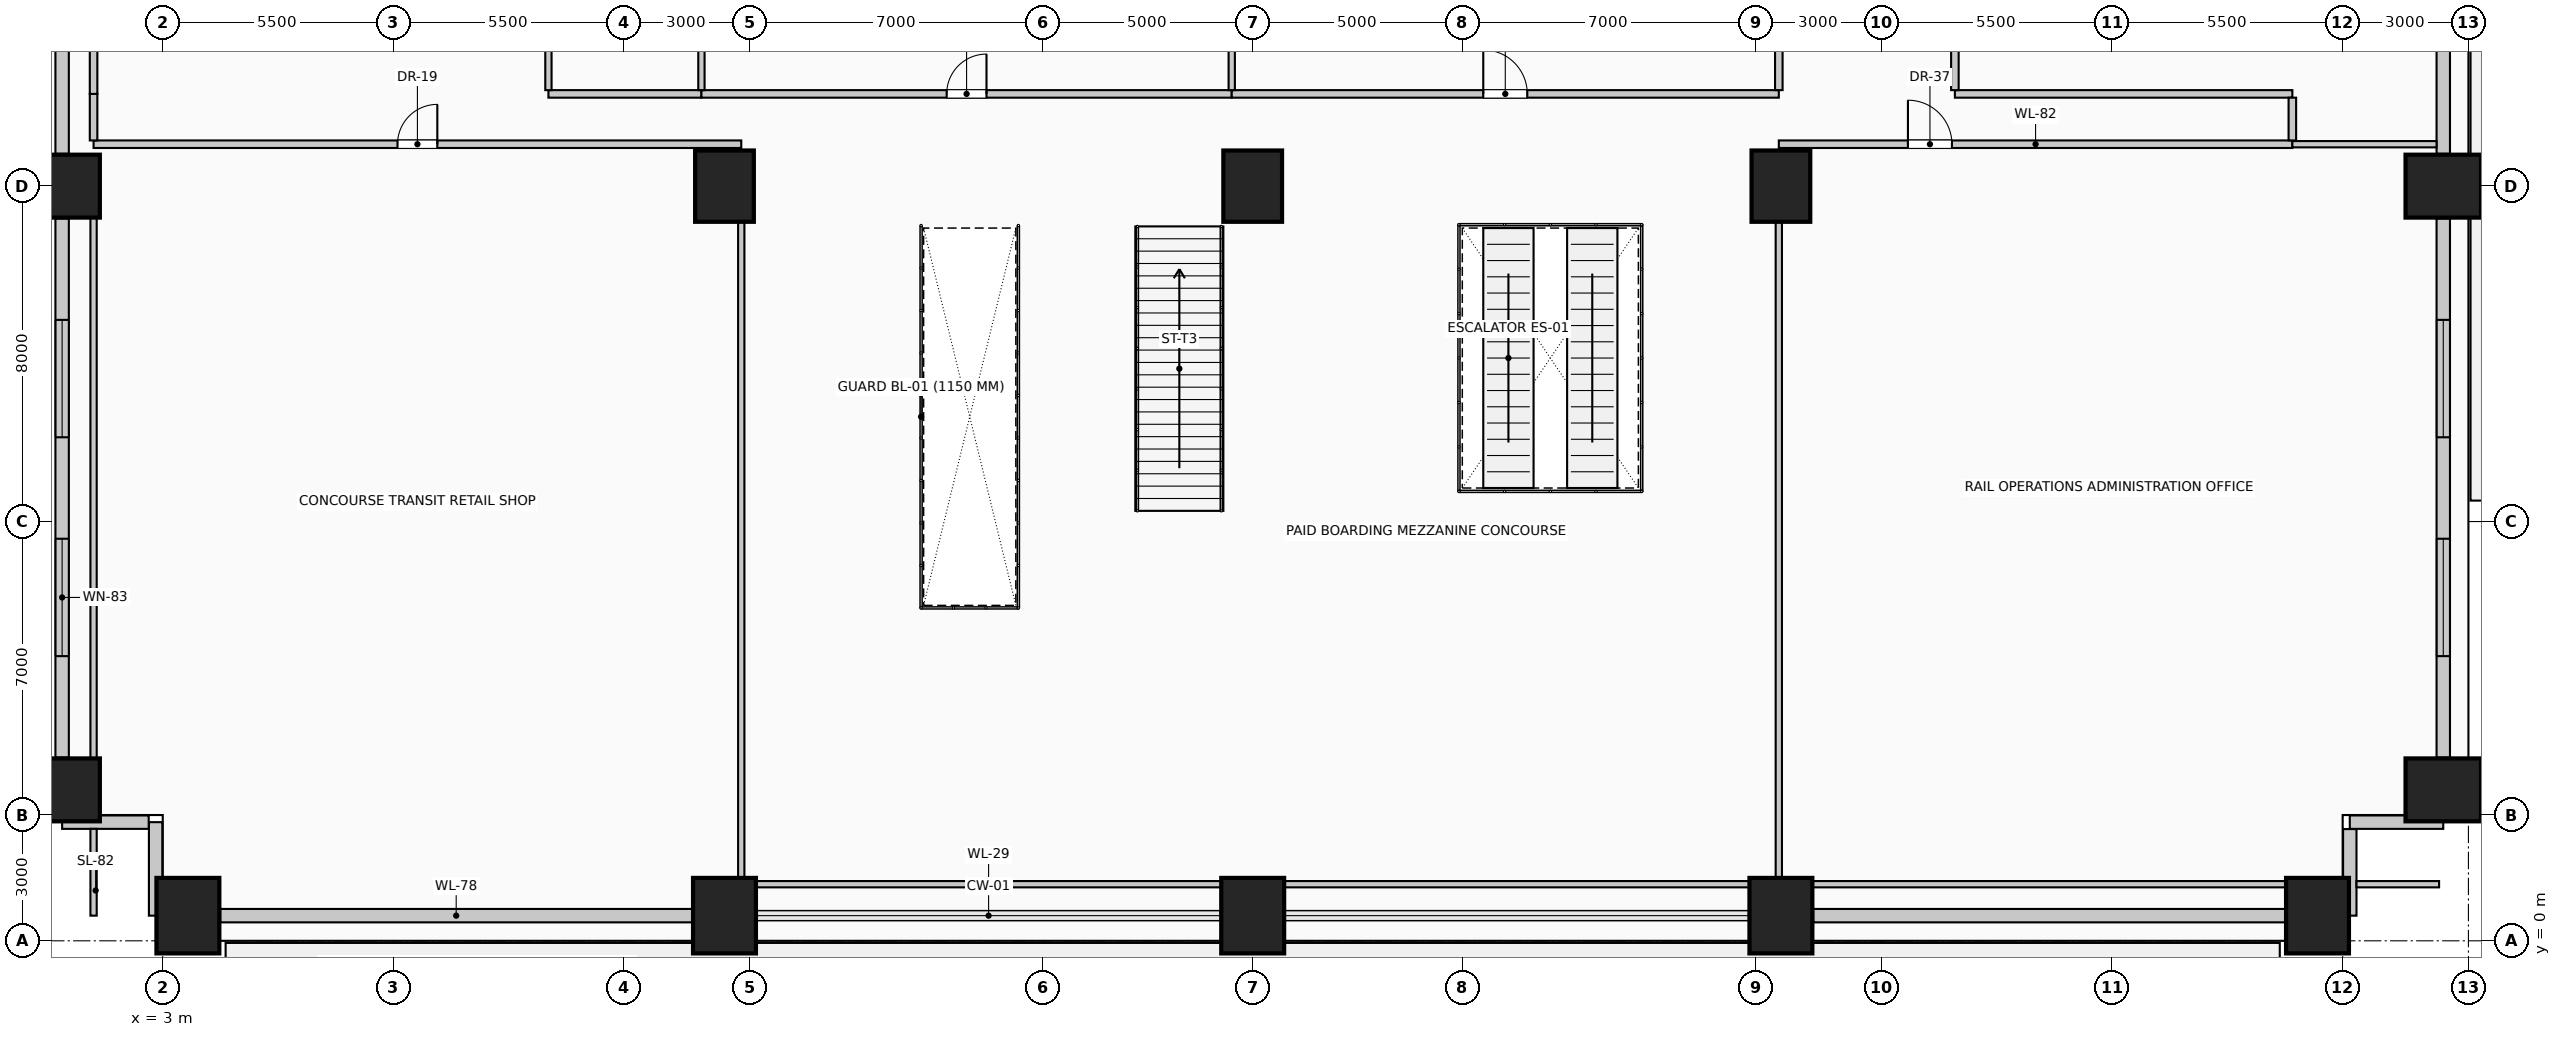
"""IFC4 building model, lengths in metres.
Left out: names, types, materials, properties, quantities, classifications, styles, units other than length and angle.
Written with IfcOpenShell. Run it as: python <this file> out.ifc"""

import sys

from ifc_helpers import new_model, si_unit, direction, frame, frame_2d, origin, origin_2d, place, context, subcontext, project, spatial, rectangle, extrude, element, fill, save


model = new_model("IFC4")
c1 = context("Model", 3, precision=1e-05, world=origin(), true_north=direction((0.0, 1.0)))
c2 = subcontext(c1, "Body", "Model", "MODEL_VIEW")
j1 = project(units=[si_unit("LENGTHUNIT", "METRE"), si_unit("PLANEANGLEUNIT", "RADIAN")], contexts=[c1])
p1 = place(None, origin())
s1 = spatial("IfcSite", under=j1, at=p1, CompositionType="ELEMENT")
p2 = place(p1, origin())
s2 = spatial("IfcBuilding", under=s1, at=p2, CompositionType="ELEMENT")
p3 = place(p2, frame((0.0, 0.0, 5.4)))
s3 = spatial("IfcBuildingStorey", under=s2, at=p3, CompositionType="ELEMENT", Elevation=5.4)
for number, where, z_axis, x_axis in (
    (1, (3.6, 0.6, 0.0), (0.0, 0.0, 1.0), (1.0, 0.0, 0.0)),
    (2, (16.4, 0.6, 0.0), (0.0, 0.0, 1.0), (1.0, 0.0, 0.0)),
    (3, (29.0, 0.6, 0.0), (0.0, 0.0, 1.0), (1.0, 0.0, 0.0)),
    (4, (41.6, 0.6, 0.0), (0.0, 0.0, 1.0), (1.0, 0.0, 0.0)),
    (5, (54.4, 0.6, 0.0), (0.0, 0.0, 1.0), (1.0, 0.0, 0.0)),
    (6, (0.6, 3.6, 0.0), (0.0, 0.0, 1.0), (0.0, 1.0, 0.0)),
    (7, (57.4, 3.6, 0.0), (0.0, 0.0, 1.0), (0.0, 1.0, 0.0)),
    (8, (0.6, 18.0, 0.0), (0.0, 0.0, 1.0), (0.0, 1.0, 0.0)),
    (9, (57.4, 18.0, 0.0), (0.0, 0.0, 1.0), (0.0, 1.0, 0.0)),
):
    element("IfcColumn", number, at=place(p3, frame(where, z_axis=z_axis, x_axis=x_axis)), inside=s3, PredefinedType="COLUMN", context=c2, shape_type="SweptSolid", body=[
        extrude(rectangle(XDim=1.5, YDim=1.8, at=origin_2d()), origin(), (0.0, 0.0, 1.0), 4.05),
    ])
for number, where, z_axis, x_axis in (
    (10, (16.4, 18.0, 0.0), (0.0, 0.0, 1.0), (1.0, 0.0, 0.0)),
    (11, (29.0, 18.0, 0.0), (0.0, 0.0, 1.0), (1.0, 0.0, 0.0)),
    (12, (41.6, 18.0, 0.0), (0.0, 0.0, 1.0), (1.0, 0.0, 0.0)),
):
    element("IfcColumn", number, at=place(p3, frame(where, z_axis=z_axis, x_axis=x_axis)), inside=s3, PredefinedType="COLUMN", context=c2, shape_type="SweptSolid", body=[
        extrude(rectangle(XDim=1.4, YDim=1.7, at=origin_2d()), origin(), (0.0, 0.0, 1.0), 4.05),
    ])
for number, where, z_axis, x_axis in (
    (13, (15.63, 0.6, 0.0), (0.0, 0.0, 1.0), (-1.0, 0.0, 0.0)),
    (14, (53.63, 0.6, 0.0), (0.0, 0.0, 1.0), (-1.0, 0.0, 0.0)),
):
    element("IfcWall", number, at=place(p3, frame(where, z_axis=z_axis, x_axis=x_axis)), inside=s3, PredefinedType="SOLIDWALL", context=c2, shape_type="SweptSolid", body=[
        extrude(rectangle(XDim=11.26, YDim=0.32, at=frame_2d((5.63, 0.0))), origin(), (0.0, 0.0, 1.0), 2.7),
    ])
p4 = place(p3, frame((0.6, 4.37, 0.0), z_axis=(0.0, 0.0, 1.0), x_axis=(0.0, 1.0, 0.0)))
e15 = element("IfcWall", 15, at=p4, inside=s3, PredefinedType="SOLIDWALL", context=c2, shape_type="SweptSolid", body=[
    extrude(rectangle(XDim=12.86, YDim=0.32, at=frame_2d((6.43, 0.0))), origin(), (0.0, 0.0, 1.0), 2.7),
])
p5 = place(p4, frame((2.42, 0.0, 0.45)))
e16 = element("IfcOpeningElement", 16, at=p5, cuts=e15, PredefinedType="OPENING", context=c2, shape_type="SweptSolid", body=[
    extrude(rectangle(XDim=2.8, YDim=2.1, at=frame_2d((1.4, 1.05))), frame((0.0, 0.17, 0.0), z_axis=(0.0, -1.0, 0.0), x_axis=(1.0, 0.0, 0.0)), (0.0, 0.0, 1.0), 0.34),
])
p6 = place(p4, frame((7.64, 0.0, 0.45)))
e17 = element("IfcOpeningElement", 17, at=p6, cuts=e15, PredefinedType="OPENING", context=c2, shape_type="SweptSolid", body=[
    extrude(rectangle(XDim=2.8, YDim=2.1, at=frame_2d((1.4, 1.05))), frame((0.0, 0.17, 0.0), z_axis=(0.0, -1.0, 0.0), x_axis=(1.0, 0.0, 0.0)), (0.0, 0.0, 1.0), 0.34),
])
p7 = place(p3, frame((0.6, 18.77, 0.0), z_axis=(0.0, 0.0, 1.0), x_axis=(0.0, 1.0, 0.0)))
e18 = element("IfcWall", 18, at=p7, inside=s3, PredefinedType="SOLIDWALL", context=c2, shape_type="SweptSolid", body=[
    extrude(rectangle(XDim=14.46, YDim=0.32, at=frame_2d((7.23, 0.0))), origin(), (0.0, 0.0, 1.0), 2.7),
])
p8 = place(p3, frame((57.4, 17.23, 0.0), z_axis=(0.0, 0.0, 1.0), x_axis=(0.0, -1.0, 0.0)))
e19 = element("IfcWall", 19, at=p8, inside=s3, PredefinedType="SOLIDWALL", context=c2, shape_type="SweptSolid", body=[
    extrude(rectangle(XDim=12.86, YDim=0.32, at=frame_2d((6.43, 0.0))), origin(), (0.0, 0.0, 1.0), 2.7),
])
p9 = place(p8, frame((2.42, 0.0, 0.45)))
e20 = element("IfcOpeningElement", 20, at=p9, cuts=e19, PredefinedType="OPENING", context=c2, shape_type="SweptSolid", body=[
    extrude(rectangle(XDim=2.8, YDim=2.1, at=frame_2d((1.4, 1.05))), frame((0.0, 0.17, 0.0), z_axis=(0.0, -1.0, 0.0), x_axis=(1.0, 0.0, 0.0)), (0.0, 0.0, 1.0), 0.34),
])
p10 = place(p8, frame((7.64, 0.0, 0.45)))
e21 = element("IfcOpeningElement", 21, at=p10, cuts=e19, PredefinedType="OPENING", context=c2, shape_type="SweptSolid", body=[
    extrude(rectangle(XDim=2.8, YDim=2.1, at=frame_2d((1.4, 1.05))), frame((0.0, 0.17, 0.0), z_axis=(0.0, -1.0, 0.0), x_axis=(1.0, 0.0, 0.0)), (0.0, 0.0, 1.0), 0.34),
])
p11 = place(p3, frame((57.4, 33.23, 0.0), z_axis=(0.0, 0.0, 1.0), x_axis=(0.0, -1.0, 0.0)))
e22 = element("IfcWall", 22, at=p11, inside=s3, PredefinedType="SOLIDWALL", context=c2, shape_type="SweptSolid", body=[
    extrude(rectangle(XDim=14.46, YDim=0.32, at=frame_2d((7.23, 0.0))), origin(), (0.0, 0.0, 1.0), 2.7),
])
p12 = place(p3, frame((57.4, 2.83, 0.0), z_axis=(0.0, 0.0, 1.0), x_axis=(-1.0, 0.0, 0.0)))
e23 = element("IfcWall", 23, at=p12, inside=s3, PredefinedType="SOLIDWALL", context=c2, shape_type="SweptSolid", body=[
    extrude(rectangle(XDim=2.23, YDim=0.32, at=frame_2d((1.115, 0.0))), origin(), (0.0, 0.0, 1.0), 3.65),
])
p13 = place(p3, frame((55.17, 2.665, 0.0), z_axis=(0.0, 0.0, 1.0), x_axis=(0.0, -1.0, 0.0)))
e24 = element("IfcWall", 24, at=p13, inside=s3, PredefinedType="SOLIDWALL", context=c2, shape_type="SweptSolid", body=[
    extrude(rectangle(XDim=2.065, YDim=0.32, at=frame_2d((1.032, 0.0))), origin(), (0.0, 0.0, 1.0), 3.65),
])
p14 = place(p3, frame((2.83, 0.6, 0.0), z_axis=(0.0, 0.0, 1.0), x_axis=(0.0, 1.0, 0.0)))
e25 = element("IfcWall", 25, at=p14, inside=s3, PredefinedType="SOLIDWALL", context=c2, shape_type="SweptSolid", body=[
    extrude(rectangle(XDim=2.23, YDim=0.32, at=frame_2d((1.115, 0.0))), origin(), (0.0, 0.0, 1.0), 3.65),
])
p15 = place(p3, frame((2.665, 2.83, 0.0), z_axis=(0.0, 0.0, 1.0), x_axis=(-1.0, 0.0, 0.0)))
e26 = element("IfcWall", 26, at=p15, inside=s3, PredefinedType="SOLIDWALL", context=c2, shape_type="SweptSolid", body=[
    extrude(rectangle(XDim=2.065, YDim=0.32, at=frame_2d((1.032, 0.0))), origin(), (0.0, 0.0, 1.0), 3.65),
])
for number, where, z_axis, x_axis in (
    (27, (17.15, 1.35, 0.0), (0.0, 0.0, 1.0), (1.0, 0.0, 0.0)),
    (28, (29.75, 1.35, 0.0), (0.0, 0.0, 1.0), (1.0, 0.0, 0.0)),
):
    element("IfcWall", number, at=place(p3, frame(where, z_axis=z_axis, x_axis=x_axis)), inside=s3, PredefinedType="PARTITIONING", context=c2, shape_type="SweptSolid", body=[
        extrude(rectangle(XDim=11.1, YDim=0.15, at=frame_2d((5.55, 0.0))), origin(), (0.0, 0.0, 1.0), 3.65),
    ])
p16 = place(p3, frame((42.35, 1.35, 0.0), z_axis=(0.0, 0.0, 1.0), x_axis=(1.0, 0.0, 0.0)))
e29 = element("IfcWall", 29, at=p16, inside=s3, PredefinedType="PARTITIONING", context=c2, shape_type="SweptSolid", body=[
    extrude(rectangle(XDim=11.3, YDim=0.15, at=frame_2d((5.65, 0.0))), origin(), (0.0, 0.0, 1.0), 3.65),
])
p17 = place(p3, frame((55.33, 1.35, 0.0), z_axis=(0.0, 0.0, 1.0), x_axis=(1.0, 0.0, 0.0)))
e30 = element("IfcWall", 30, at=p17, inside=s3, PredefinedType="PARTITIONING", context=c2, shape_type="SweptSolid", body=[
    extrude(rectangle(XDim=1.97, YDim=0.15, at=frame_2d((0.985, 0.0))), origin(), (0.0, 0.0, 1.0), 3.65),
])
p18 = place(p3, frame((1.35, 19.0, 0.0), z_axis=(0.0, 0.0, 1.0), x_axis=(1.0, 0.0, 0.0)))
e31 = element("IfcWall", 31, at=p18, inside=s3, PredefinedType="PARTITIONING", context=c2, shape_type="SweptSolid", body=[
    extrude(rectangle(XDim=15.45, YDim=0.18, at=frame_2d((7.725, 0.0))), origin(), (0.0, 0.0, 1.0), 3.65),
])
p19 = place(p18, frame((7.25, 0.0, 0.0)))
e32 = element("IfcOpeningElement", 32, at=p19, cuts=e31, PredefinedType="OPENING", context=c2, shape_type="SweptSolid", body=[
    extrude(rectangle(XDim=0.95, YDim=2.15, at=frame_2d((0.475, 1.075))), frame((0.0, 0.1, 0.0), z_axis=(0.0, -1.0, 0.0), x_axis=(1.0, 0.0, 0.0)), (0.0, 0.0, 1.0), 0.2),
])
p20 = place(p3, frame((41.55, 19.0, 0.0), z_axis=(0.0, 0.0, 1.0), x_axis=(1.0, 0.0, 0.0)))
e33 = element("IfcWall", 33, at=p20, inside=s3, PredefinedType="PARTITIONING", context=c2, shape_type="SweptSolid", body=[
    extrude(rectangle(XDim=12.25, YDim=0.18, at=frame_2d((6.125, 0.0))), origin(), (0.0, 0.0, 1.0), 3.65),
])
p21 = place(p20, frame((3.08, 0.0, 0.0)))
e34 = element("IfcOpeningElement", 34, at=p21, cuts=e33, PredefinedType="OPENING", context=c2, shape_type="SweptSolid", body=[
    extrude(rectangle(XDim=1.05, YDim=2.15, at=frame_2d((0.525, 1.075))), frame((0.0, 0.1, 0.0), z_axis=(0.0, -1.0, 0.0), x_axis=(1.0, 0.0, 0.0)), (0.0, 0.0, 1.0), 0.2),
])
p22 = place(p3, frame((53.8, 19.0, 0.0), z_axis=(0.0, 0.0, 1.0), x_axis=(1.0, 0.0, 0.0)))
e35 = element("IfcWall", 35, at=p22, inside=s3, PredefinedType="PARTITIONING", context=c2, shape_type="SweptSolid", body=[
    extrude(rectangle(XDim=3.44, YDim=0.15, at=frame_2d((1.72, 0.0))), origin(), (0.0, 0.0, 1.0), 3.65),
])
p23 = place(p3, frame((12.2, 20.2, 0.0), z_axis=(0.0, 0.0, 1.0), x_axis=(1.0, 0.0, 0.0)))
e36 = element("IfcWall", 36, at=p23, inside=s3, PredefinedType="PARTITIONING", context=c2, shape_type="SweptSolid", body=[
    extrude(rectangle(XDim=3.65, YDim=0.18, at=frame_2d((1.825, 0.0))), origin(), (0.0, 0.0, 1.0), 3.65),
])
p24 = place(p3, frame((15.85, 20.2, 0.0), z_axis=(0.0, 0.0, 1.0), x_axis=(1.0, 0.0, 0.0)))
e37 = element("IfcWall", 37, at=p24, inside=s3, PredefinedType="PARTITIONING", context=c2, shape_type="SweptSolid", body=[
    extrude(rectangle(XDim=12.65, YDim=0.18, at=frame_2d((6.325, 0.0))), origin(), (0.0, 0.0, 1.0), 3.65),
])
p25 = place(p24, frame((5.85, 0.0, 0.0)))
e38 = element("IfcOpeningElement", 38, at=p25, cuts=e37, PredefinedType="OPENING", context=c2, shape_type="SweptSolid", body=[
    extrude(rectangle(XDim=0.95, YDim=2.15, at=frame_2d((0.475, 1.075))), frame((0.0, 0.1, 0.0), z_axis=(0.0, -1.0, 0.0), x_axis=(1.0, 0.0, 0.0)), (0.0, 0.0, 1.0), 0.2),
])
p26 = place(p3, frame((28.5, 20.2, 0.0), z_axis=(0.0, 0.0, 1.0), x_axis=(1.0, 0.0, 0.0)))
e39 = element("IfcWall", 39, at=p26, inside=s3, PredefinedType="PARTITIONING", context=c2, shape_type="SweptSolid", body=[
    extrude(rectangle(XDim=13.05, YDim=0.18, at=frame_2d((6.525, 0.0))), origin(), (0.0, 0.0, 1.0), 3.65),
])
p27 = place(p26, frame((6.0, 0.0, 0.0)))
e40 = element("IfcOpeningElement", 40, at=p27, cuts=e39, PredefinedType="OPENING", context=c2, shape_type="SweptSolid", body=[
    extrude(rectangle(XDim=1.05, YDim=2.15, at=frame_2d((0.525, 1.075))), frame((0.0, 0.1, 0.0), z_axis=(0.0, -1.0, 0.0), x_axis=(1.0, 0.0, 0.0)), (0.0, 0.0, 1.0), 0.2),
])
p28 = place(p3, frame((45.75, 20.2, 0.0), z_axis=(0.0, 0.0, 1.0), x_axis=(1.0, 0.0, 0.0)))
e41 = element("IfcWall", 41, at=p28, inside=s3, PredefinedType="PARTITIONING", context=c2, shape_type="SweptSolid", body=[
    extrude(rectangle(XDim=8.05, YDim=0.18, at=frame_2d((4.025, 0.0))), origin(), (0.0, 0.0, 1.0), 3.65),
])
p29 = place(p3, frame((1.35, 0.6, 0.0), z_axis=(0.0, 0.0, 1.0), x_axis=(0.0, 1.0, 0.0)))
e42 = element("IfcWall", 42, at=p29, inside=s3, PredefinedType="PARTITIONING", context=c2, shape_type="SweptSolid", body=[
    extrude(rectangle(XDim=2.07, YDim=0.15, at=frame_2d((1.035, 0.0))), origin(), (0.0, 0.0, 1.0), 3.65),
])
p30 = place(p3, frame((1.35, 4.35, 0.0), z_axis=(0.0, 0.0, 1.0), x_axis=(0.0, 1.0, 0.0)))
e43 = element("IfcWall", 43, at=p30, inside=s3, PredefinedType="PARTITIONING", context=c2, shape_type="SweptSolid", body=[
    extrude(rectangle(XDim=12.9, YDim=0.15, at=frame_2d((6.45, 0.0))), origin(), (0.0, 0.0, 1.0), 3.65),
])
p31 = place(p3, frame((1.35, 19.09, 0.0), z_axis=(0.0, 0.0, 1.0), x_axis=(0.0, 1.0, 0.0)))
e44 = element("IfcWall", 44, at=p31, inside=s3, PredefinedType="PARTITIONING", context=c2, shape_type="SweptSolid", body=[
    extrude(rectangle(XDim=1.11, YDim=0.18, at=frame_2d((0.555, 0.0))), origin(), (0.0, 0.0, 1.0), 3.65),
])
p32 = place(p3, frame((1.35, 20.2, 0.0), z_axis=(0.0, 0.0, 1.0), x_axis=(0.0, 1.0, 0.0)))
e45 = element("IfcWall", 45, at=p32, inside=s3, PredefinedType="PARTITIONING", context=c2, shape_type="SweptSolid", body=[
    extrude(rectangle(XDim=13.05, YDim=0.18, at=frame_2d((6.525, 0.0))), origin(), (0.0, 0.0, 1.0), 3.65),
])
p33 = place(p3, frame((12.2, 20.29, 0.0), z_axis=(0.0, 0.0, 1.0), x_axis=(0.0, 1.0, 0.0)))
e46 = element("IfcWall", 46, at=p33, inside=s3, PredefinedType="PARTITIONING", context=c2, shape_type="SweptSolid", body=[
    extrude(rectangle(XDim=1.81, YDim=0.15, at=frame_2d((0.905, 0.0))), origin(), (0.0, 0.0, 1.0), 3.65),
])
p34 = place(p3, frame((15.85, 20.29, 0.0), z_axis=(0.0, 0.0, 1.0), x_axis=(0.0, 1.0, 0.0)))
e47 = element("IfcWall", 47, at=p34, inside=s3, PredefinedType="PARTITIONING", context=c2, shape_type="SweptSolid", body=[
    extrude(rectangle(XDim=4.51, YDim=0.15, at=frame_2d((2.255, 0.0))), origin(), (0.0, 0.0, 1.0), 3.65),
])
p35 = place(p3, frame((16.8, 1.5, 0.0), z_axis=(0.0, 0.0, 1.0), x_axis=(0.0, 1.0, 0.0)))
e48 = element("IfcWall", 48, at=p35, inside=s3, PredefinedType="PARTITIONING", context=c2, shape_type="SweptSolid", body=[
    extrude(rectangle(XDim=15.65, YDim=0.15, at=frame_2d((7.825, 0.0))), origin(), (0.0, 0.0, 1.0), 2.695),
])
p36 = place(p3, frame((28.5, 20.29, 0.0), z_axis=(0.0, 0.0, 1.0), x_axis=(0.0, 1.0, 0.0)))
e49 = element("IfcWall", 49, at=p36, inside=s3, PredefinedType="PARTITIONING", context=c2, shape_type="SweptSolid", body=[
    extrude(rectangle(XDim=12.86, YDim=0.15, at=frame_2d((6.43, 0.0))), origin(), (0.0, 0.0, 1.0), 3.65),
])
p37 = place(p3, frame((41.55, 1.5, 0.0), z_axis=(0.0, 0.0, 1.0), x_axis=(0.0, 1.0, 0.0)))
e50 = element("IfcWall", 50, at=p37, inside=s3, PredefinedType="PARTITIONING", context=c2, shape_type="SweptSolid", body=[
    extrude(rectangle(XDim=15.65, YDim=0.15, at=frame_2d((7.825, 0.0))), origin(), (0.0, 0.0, 1.0), 2.695),
])
p38 = place(p3, frame((41.55, 20.29, 0.0), z_axis=(0.0, 0.0, 1.0), x_axis=(0.0, 1.0, 0.0)))
e51 = element("IfcWall", 51, at=p38, inside=s3, PredefinedType="PARTITIONING", context=c2, shape_type="SweptSolid", body=[
    extrude(rectangle(XDim=12.06, YDim=0.18, at=frame_2d((6.03, 0.0))), origin(), (0.0, 0.0, 1.0), 2.695),
])
p39 = place(p3, frame((45.75, 20.29, 0.0), z_axis=(0.0, 0.0, 1.0), x_axis=(0.0, 1.0, 0.0)))
e52 = element("IfcWall", 52, at=p39, inside=s3, PredefinedType="PARTITIONING", context=c2, shape_type="SweptSolid", body=[
    extrude(rectangle(XDim=11.985, YDim=0.18, at=frame_2d((5.992, 0.0))), origin(), (0.0, 0.0, 1.0), 3.65),
])
p40 = place(p3, frame((53.8, 19.09, 0.0), z_axis=(0.0, 0.0, 1.0), x_axis=(0.0, 1.0, 0.0)))
e53 = element("IfcWall", 53, at=p40, inside=s3, PredefinedType="PARTITIONING", context=c2, shape_type="SweptSolid", body=[
    extrude(rectangle(XDim=1.02, YDim=0.18, at=frame_2d((0.51, 0.0))), origin(), (0.0, 0.0, 1.0), 3.65),
])
p41 = place(p5, origin())
e54 = element("IfcWindow", 54, at=p41, inside=s3, PartitioningType="SINGLE_PANEL", PredefinedType="WINDOW", context=c2, shape_type="SweptSolid", body=[
    extrude(rectangle(XDim=2.8, YDim=2.1, at=frame_2d((1.4, 1.05))), frame((0.0, 0.03, 0.0), z_axis=(0.0, -1.0, 0.0), x_axis=(1.0, 0.0, 0.0)), (0.0, 0.0, 1.0), 0.06),
])
fill(e16, e54)
p42 = place(p6, origin())
e55 = element("IfcWindow", 55, at=p42, inside=s3, PartitioningType="SINGLE_PANEL", PredefinedType="WINDOW", context=c2, shape_type="SweptSolid", body=[
    extrude(rectangle(XDim=2.8, YDim=2.1, at=frame_2d((1.4, 1.05))), frame((0.0, 0.03, 0.0), z_axis=(0.0, -1.0, 0.0), x_axis=(1.0, 0.0, 0.0)), (0.0, 0.0, 1.0), 0.06),
])
fill(e17, e55)
p43 = place(p9, origin())
e56 = element("IfcWindow", 56, at=p43, inside=s3, PartitioningType="SINGLE_PANEL", PredefinedType="WINDOW", context=c2, shape_type="SweptSolid", body=[
    extrude(rectangle(XDim=2.8, YDim=2.1, at=frame_2d((1.4, 1.05))), frame((0.0, 0.03, 0.0), z_axis=(0.0, -1.0, 0.0), x_axis=(1.0, 0.0, 0.0)), (0.0, 0.0, 1.0), 0.06),
])
fill(e20, e56)
p44 = place(p10, origin())
e57 = element("IfcWindow", 57, at=p44, inside=s3, PartitioningType="SINGLE_PANEL", PredefinedType="WINDOW", context=c2, shape_type="SweptSolid", body=[
    extrude(rectangle(XDim=2.8, YDim=2.1, at=frame_2d((1.4, 1.05))), frame((0.0, 0.03, 0.0), z_axis=(0.0, -1.0, 0.0), x_axis=(1.0, 0.0, 0.0)), (0.0, 0.0, 1.0), 0.06),
])
fill(e21, e57)
p45 = place(p19, origin())
e58 = element("IfcDoor", 58, at=p45, inside=s3, OperationType="SINGLE_SWING_RIGHT", PredefinedType="DOOR", context=c2, shape_type="SweptSolid", body=[
    extrude(rectangle(XDim=0.95, YDim=2.15, at=frame_2d((0.475, 1.075))), frame((0.0, 0.025, 0.0), z_axis=(0.0, -1.0, 0.0), x_axis=(1.0, 0.0, 0.0)), (0.0, 0.0, 1.0), 0.05),
])
fill(e32, e58)
p46 = place(p21, origin())
e59 = element("IfcDoor", 59, at=p46, inside=s3, OperationType="SINGLE_SWING_LEFT", PredefinedType="DOOR", context=c2, shape_type="SweptSolid", body=[
    extrude(rectangle(XDim=1.05, YDim=2.15, at=frame_2d((0.525, 1.075))), frame((0.0, 0.025, 0.0), z_axis=(0.0, -1.0, 0.0), x_axis=(1.0, 0.0, 0.0)), (0.0, 0.0, 1.0), 0.05),
])
fill(e34, e59)
p47 = place(p25, origin())
e60 = element("IfcDoor", 60, at=p47, inside=s3, OperationType="SINGLE_SWING_RIGHT", PredefinedType="DOOR", context=c2, shape_type="SweptSolid", body=[
    extrude(rectangle(XDim=0.95, YDim=2.15, at=frame_2d((0.475, 1.075))), frame((0.0, 0.025, 0.0), z_axis=(0.0, -1.0, 0.0), x_axis=(1.0, 0.0, 0.0)), (0.0, 0.0, 1.0), 0.05),
])
fill(e38, e60)
p48 = place(p27, origin())
e61 = element("IfcDoor", 61, at=p48, inside=s3, OperationType="SINGLE_SWING_LEFT", PredefinedType="DOOR", context=c2, shape_type="SweptSolid", body=[
    extrude(rectangle(XDim=1.05, YDim=2.15, at=frame_2d((0.525, 1.075))), frame((0.0, 0.025, 0.0), z_axis=(0.0, -1.0, 0.0), x_axis=(1.0, 0.0, 0.0)), (0.0, 0.0, 1.0), 0.05),
])
fill(e40, e61)
save(model, sys.argv[1])
